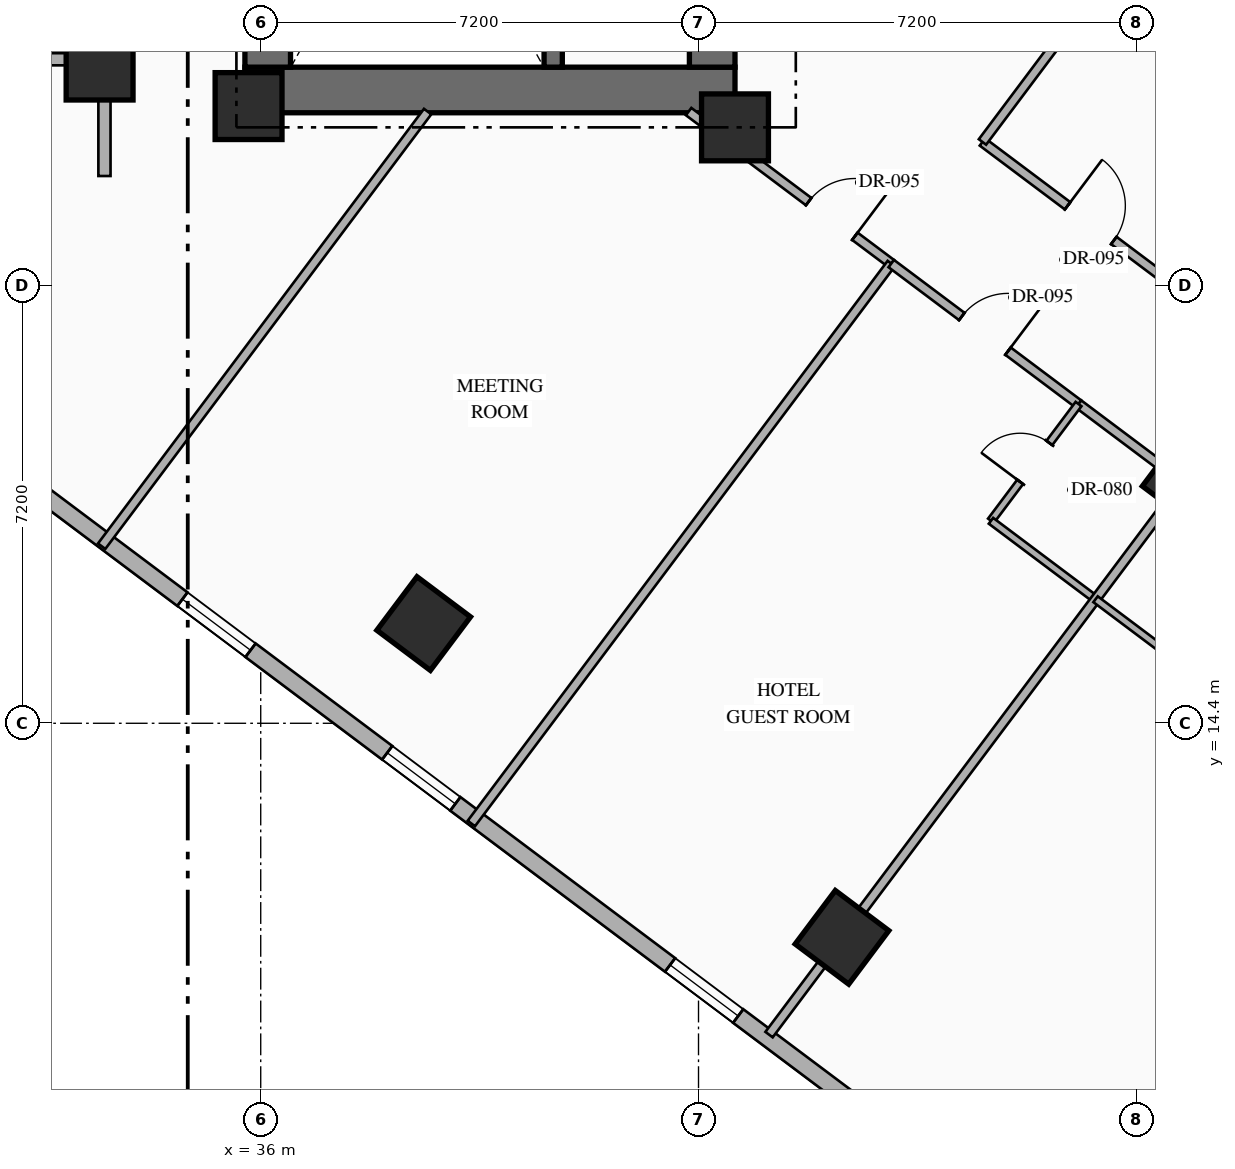
"""IFC4 building model, lengths in metres.
Left out: names, types, materials, properties, quantities, classifications, styles, units other than length and angle.
Written with IfcOpenShell. Run it as: python <this file> out.ifc"""

import sys

from ifc_helpers import new_model, si_unit, direction, frame, frame_2d, origin, origin_2d, place, context, subcontext, project, spatial, rectangle, hollow_rectangle, extrude, element, fill, save


model = new_model("IFC4")
c1 = context("Model", 3, precision=1e-05, world=origin(), true_north=direction((0.0, 1.0)))
c2 = subcontext(c1, "Body", "Model", "MODEL_VIEW")
j1 = project(units=[si_unit("LENGTHUNIT", "METRE"), si_unit("PLANEANGLEUNIT", "RADIAN")], contexts=[c1])
p1 = place(None, origin())
s1 = spatial("IfcSite", under=j1, at=p1, CompositionType="ELEMENT")
p2 = place(p1, origin())
s2 = spatial("IfcBuilding", under=s1, at=p2, CompositionType="ELEMENT")
p3 = place(p2, frame((0.0, 0.0, 53.35)))
s3 = spatial("IfcBuildingStorey", under=s2, at=p3, CompositionType="ELEMENT", Elevation=53.35)
p4 = place(p3, frame((35.74, 24.815, 0.0), z_axis=(0.0, 0.0, 1.0), x_axis=(1.0, 0.0, 0.0)))
e1 = element("IfcWall", 1, at=p4, inside=s3, PredefinedType="SHEAR", context=c2, shape_type="SweptSolid", body=[
    extrude(rectangle(XDim=8.06, YDim=0.75, at=frame_2d((4.03, 0.0))), origin(), (0.0, 0.0, 1.0), 3.35),
])
p5 = place(p3, frame((36.115, 25.19, 0.0), z_axis=(0.0, 0.0, 1.0), x_axis=(0.0, 1.0, 0.0)))
e2 = element("IfcWall", 2, at=p5, inside=s3, PredefinedType="SHEAR", context=c2, shape_type="SweptSolid", body=[
    extrude(rectangle(XDim=9.48, YDim=0.75, at=frame_2d((4.74, 0.0))), origin(), (0.0, 0.0, 1.0), 3.35),
])
p6 = place(p3, frame((43.425, 25.19, 0.0), z_axis=(0.0, 0.0, 1.0), x_axis=(0.0, 1.0, 0.0)))
e3 = element("IfcWall", 3, at=p6, inside=s3, PredefinedType="SHEAR", context=c2, shape_type="SweptSolid", body=[
    extrude(rectangle(XDim=9.48, YDim=0.75, at=frame_2d((4.74, 0.0))), origin(), (0.0, 0.0, 1.0), 3.35),
])
p7 = place(p6, frame((1.51, 0.0, 0.0)))
e4 = element("IfcOpeningElement", 4, at=p7, cuts=e3, PredefinedType="OPENING", context=c2, shape_type="SweptSolid", body=[
    extrude(rectangle(XDim=0.85, YDim=2.08, at=frame_2d((0.425, 1.04))), frame((0.0, 0.385, 0.0), z_axis=(0.0, -1.0, 0.0), x_axis=(1.0, 0.0, 0.0)), (0.0, 0.0, 1.0), 0.77),
])
p8 = place(p6, frame((4.76, 0.0, 0.0)))
e5 = element("IfcOpeningElement", 5, at=p8, cuts=e3, PredefinedType="OPENING", context=c2, shape_type="SweptSolid", body=[
    extrude(rectangle(XDim=0.85, YDim=2.08, at=frame_2d((0.425, 1.04))), frame((0.0, 0.385, 0.0), z_axis=(0.0, -1.0, 0.0), x_axis=(1.0, 0.0, 0.0)), (0.0, 0.0, 1.0), 0.77),
])
p9 = place(p3, frame((40.81, 25.19, 0.0), z_axis=(0.0, 0.0, 1.0), x_axis=(0.0, 1.0, 0.0)))
e6 = element("IfcWall", 6, at=p9, inside=s3, PredefinedType="SHEAR", context=c2, shape_type="SweptSolid", body=[
    extrude(rectangle(XDim=9.48, YDim=0.3, at=frame_2d((4.74, 0.0))), origin(), (0.0, 0.0, 1.0), 3.35),
])
for number, where, z_axis, x_axis in (
    (7, (35.8, 24.55, 0.0), (0.0, 0.0, 1.0), (1.0, 0.0, 0.0)),
    (8, (43.8, 24.2, 0.0), (0.0, 0.0, 1.0), (1.0, 0.0, 0.0)),
):
    element("IfcColumn", number, at=place(p3, frame(where, z_axis=z_axis, x_axis=x_axis)), inside=s3, PredefinedType="COLUMN", context=c2, shape_type="SweptSolid", body=[
        extrude(rectangle(XDim=1.1, YDim=1.1, at=origin_2d()), origin(), (0.0, 0.0, 1.0), 3.35),
    ])
for number, where, z_axis, x_axis in (
    (9, (33.35, 25.2, 0.0), (0.0, 0.0, 1.0), (1.0, 0.0, 0.0)),
    (10, (38.68, 16.04, 0.0), (0.0, 0.0, 1.0), (0.8, -0.6, 0.0)),
    (11, (45.56, 10.88, 0.0), (0.0, 0.0, 1.0), (0.8, -0.6, 0.0)),
):
    element("IfcColumn", number, at=place(p3, frame(where, z_axis=z_axis, x_axis=x_axis)), inside=s3, PredefinedType="COLUMN", context=c2, shape_type="SweptSolid", body=[
        extrude(hollow_rectangle(XDim=1.1, YDim=1.1, WallThickness=0.04, at=origin_2d()), origin(), (0.0, 0.0, 1.0), 3.35),
    ])
p10 = place(p3, frame((51.2, 18.4, 0.0), z_axis=(0.0, 0.0, 1.0), x_axis=(0.799999996291, -0.600000004945, 0.0)))
e12 = element("IfcColumn", 12, at=p10, inside=s3, PredefinedType="COLUMN", context=c2, shape_type="SweptSolid", body=[
    extrude(hollow_rectangle(XDim=1.0, YDim=1.0, WallThickness=0.038, at=origin_2d()), origin(), (0.0, 0.0, 1.0), 3.35),
])
p11 = place(p3, frame((44.86, 40.73, 0.0), z_axis=(0.0, 0.0, 1.0), x_axis=(0.800006902154, -0.599990797017, 0.0)))
e13 = element("IfcWall", 13, at=p11, inside=s3, PredefinedType="STANDARD", context=c2, shape_type="SweptSolid", body=[
    extrude(rectangle(XDim=29.712, YDim=0.28, at=frame_2d((14.856, 0.0))), origin(), (0.0, 0.0, 1.0), 3.13),
])
p12 = place(p11, frame((14.249, 0.0, 0.0)))
e14 = element("IfcOpeningElement", 14, at=p12, cuts=e13, PredefinedType="OPENING", context=c2, shape_type="SweptSolid", body=[
    extrude(rectangle(XDim=1.1, YDim=2.2, at=frame_2d((0.55, 1.1))), frame((0.0, 0.15, 0.0), z_axis=(0.0, -1.0, 0.0), x_axis=(1.0, 0.0, 0.0)), (0.0, 0.0, 1.0), 0.3),
])
p13 = place(p11, frame((1.612, 0.0, 0.85)))
e15 = element("IfcOpeningElement", 15, at=p13, cuts=e13, PredefinedType="OPENING", context=c2, shape_type="SweptSolid", body=[
    extrude(rectangle(XDim=1.4, YDim=1.8, at=frame_2d((0.7, 0.9))), frame((0.0, 0.15, 0.0), z_axis=(0.0, -1.0, 0.0), x_axis=(1.0, 0.0, 0.0)), (0.0, 0.0, 1.0), 0.3),
])
p14 = place(p11, frame((5.667, 0.0, 0.85)))
e16 = element("IfcOpeningElement", 16, at=p14, cuts=e13, PredefinedType="OPENING", context=c2, shape_type="SweptSolid", body=[
    extrude(rectangle(XDim=1.4, YDim=1.8, at=frame_2d((0.7, 0.9))), frame((0.0, 0.15, 0.0), z_axis=(0.0, -1.0, 0.0), x_axis=(1.0, 0.0, 0.0)), (0.0, 0.0, 1.0), 0.3),
])
p15 = place(p11, frame((9.912, 0.0, 0.85)))
e17 = element("IfcOpeningElement", 17, at=p15, cuts=e13, PredefinedType="OPENING", context=c2, shape_type="SweptSolid", body=[
    extrude(rectangle(XDim=1.4, YDim=1.8, at=frame_2d((0.7, 0.9))), frame((0.0, 0.15, 0.0), z_axis=(0.0, -1.0, 0.0), x_axis=(1.0, 0.0, 0.0)), (0.0, 0.0, 1.0), 0.3),
])
p16 = place(p11, frame((19.743, 0.0, 0.85)))
e18 = element("IfcOpeningElement", 18, at=p16, cuts=e13, PredefinedType="OPENING", context=c2, shape_type="SweptSolid", body=[
    extrude(rectangle(XDim=1.4, YDim=1.8, at=frame_2d((0.7, 0.9))), frame((0.0, 0.15, 0.0), z_axis=(0.0, -1.0, 0.0), x_axis=(1.0, 0.0, 0.0)), (0.0, 0.0, 1.0), 0.3),
])
p17 = place(p11, frame((22.645, 0.0, 0.85)))
e19 = element("IfcOpeningElement", 19, at=p17, cuts=e13, PredefinedType="OPENING", context=c2, shape_type="SweptSolid", body=[
    extrude(rectangle(XDim=1.4, YDim=1.8, at=frame_2d((0.7, 0.9))), frame((0.0, 0.15, 0.0), z_axis=(0.0, -1.0, 0.0), x_axis=(1.0, 0.0, 0.0)), (0.0, 0.0, 1.0), 0.3),
])
p18 = place(p11, frame((26.7, 0.0, 0.85)))
e20 = element("IfcOpeningElement", 20, at=p18, cuts=e13, PredefinedType="OPENING", context=c2, shape_type="SweptSolid", body=[
    extrude(rectangle(XDim=1.4, YDim=1.8, at=frame_2d((0.7, 0.9))), frame((0.0, 0.15, 0.0), z_axis=(0.0, -1.0, 0.0), x_axis=(1.0, 0.0, 0.0)), (0.0, 0.0, 1.0), 0.3),
])
p19 = place(p3, frame((53.318, 2.487, 0.0), z_axis=(0.0, 0.0, 1.0), x_axis=(-0.800004174678, 0.599994433723, 0.0)))
e21 = element("IfcWall", 21, at=p19, inside=s3, PredefinedType="STANDARD", context=c2, shape_type="SweptSolid", body=[
    extrude(rectangle(XDim=35.089, YDim=0.28, at=frame_2d((17.544, 0.0))), origin(), (0.0, 0.0, 1.0), 3.13),
])
p20 = place(p19, frame((1.931, 0.0, 0.85)))
e22 = element("IfcOpeningElement", 22, at=p20, cuts=e21, PredefinedType="OPENING", context=c2, shape_type="SweptSolid", body=[
    extrude(rectangle(XDim=1.4, YDim=1.8, at=frame_2d((0.7, 0.9))), frame((0.0, 0.15, 0.0), z_axis=(0.0, -1.0, 0.0), x_axis=(1.0, 0.0, 0.0)), (0.0, 0.0, 1.0), 0.3),
])
p21 = place(p19, frame((6.819, 0.0, 0.85)))
e23 = element("IfcOpeningElement", 23, at=p21, cuts=e21, PredefinedType="OPENING", context=c2, shape_type="SweptSolid", body=[
    extrude(rectangle(XDim=1.4, YDim=1.8, at=frame_2d((0.7, 0.9))), frame((0.0, 0.15, 0.0), z_axis=(0.0, -1.0, 0.0), x_axis=(1.0, 0.0, 0.0)), (0.0, 0.0, 1.0), 0.3),
])
p22 = place(p19, frame((11.832, 0.0, 0.85)))
e24 = element("IfcOpeningElement", 24, at=p22, cuts=e21, PredefinedType="OPENING", context=c2, shape_type="SweptSolid", body=[
    extrude(rectangle(XDim=1.4, YDim=1.8, at=frame_2d((0.7, 0.9))), frame((0.0, 0.15, 0.0), z_axis=(0.0, -1.0, 0.0), x_axis=(1.0, 0.0, 0.0)), (0.0, 0.0, 1.0), 0.3),
])
p23 = place(p19, frame((17.647, 0.0, 0.85)))
e25 = element("IfcOpeningElement", 25, at=p23, cuts=e21, PredefinedType="OPENING", context=c2, shape_type="SweptSolid", body=[
    extrude(rectangle(XDim=1.4, YDim=1.8, at=frame_2d((0.7, 0.9))), frame((0.0, 0.15, 0.0), z_axis=(0.0, -1.0, 0.0), x_axis=(1.0, 0.0, 0.0)), (0.0, 0.0, 1.0), 0.3),
])
p24 = place(p19, frame((21.857, 0.0, 0.85)))
e26 = element("IfcOpeningElement", 26, at=p24, cuts=e21, PredefinedType="OPENING", context=c2, shape_type="SweptSolid", body=[
    extrude(rectangle(XDim=1.4, YDim=1.8, at=frame_2d((0.7, 0.9))), frame((0.0, 0.15, 0.0), z_axis=(0.0, -1.0, 0.0), x_axis=(1.0, 0.0, 0.0)), (0.0, 0.0, 1.0), 0.3),
])
p25 = place(p19, frame((26.87, 0.0, 0.85)))
e27 = element("IfcOpeningElement", 27, at=p25, cuts=e21, PredefinedType="OPENING", context=c2, shape_type="SweptSolid", body=[
    extrude(rectangle(XDim=1.4, YDim=1.8, at=frame_2d((0.7, 0.9))), frame((0.0, 0.15, 0.0), z_axis=(0.0, -1.0, 0.0), x_axis=(1.0, 0.0, 0.0)), (0.0, 0.0, 1.0), 0.3),
])
p26 = place(p19, frame((31.757, 0.0, 0.85)))
e28 = element("IfcOpeningElement", 28, at=p26, cuts=e21, PredefinedType="OPENING", context=c2, shape_type="SweptSolid", body=[
    extrude(rectangle(XDim=1.4, YDim=1.8, at=frame_2d((0.7, 0.9))), frame((0.0, 0.15, 0.0), z_axis=(0.0, -1.0, 0.0), x_axis=(1.0, 0.0, 0.0)), (0.0, 0.0, 1.0), 0.3),
])
p27 = place(p3, frame((33.43, 23.4, 0.0), z_axis=(0.0, 0.0, 1.0), x_axis=(0.0, 1.0, 0.0)))
e29 = element("IfcWall", 29, at=p27, inside=s3, PredefinedType="STANDARD", context=c2, shape_type="SweptSolid", body=[
    extrude(rectangle(XDim=4.08, YDim=0.2, at=frame_2d((2.04, 0.0))), origin(), (0.0, 0.0, 1.0), 2.425),
])
p28 = place(p3, frame((25.55, 25.32, 0.0), z_axis=(0.0, 0.0, 1.0), x_axis=(1.0, 0.0, 0.0)))
e30 = element("IfcWall", 30, at=p28, inside=s3, PredefinedType="STANDARD", context=c2, shape_type="SweptSolid", body=[
    extrude(rectangle(XDim=7.88, YDim=0.2, at=frame_2d((3.94, 0.0))), origin(), (0.0, 0.0, 1.0), 2.525),
])
p29 = place(p3, frame((43.037, 24.46, 0.0), z_axis=(0.0, 0.0, 1.0), x_axis=(0.799971872363, -0.600037501685, 0.0)))
e31 = element("IfcWall", 31, at=p29, inside=s3, PredefinedType="PARTITIONING", context=c2, shape_type="SweptSolid", body=[
    extrude(rectangle(XDim=4.167, YDim=0.15, at=frame_2d((2.083, 0.0))), origin(), (0.0, 0.0, 1.0), 2.425),
])
p30 = place(p29, frame((2.468, 0.0, 0.0)))
e32 = element("IfcOpeningElement", 32, at=p30, cuts=e31, PredefinedType="OPENING", context=c2, shape_type="SweptSolid", body=[
    extrude(rectangle(XDim=0.95, YDim=2.15, at=frame_2d((0.475, 1.075))), frame((0.0, 0.085, 0.0), z_axis=(0.0, -1.0, 0.0), x_axis=(1.0, 0.0, 0.0)), (0.0, 0.0, 1.0), 0.17),
])
p31 = place(p3, frame((33.384, 17.312, 0.0), z_axis=(0.0, 0.0, 1.0), x_axis=(0.600008743659, 0.799993442181, 0.0)))
e33 = element("IfcWall", 33, at=p31, inside=s3, PredefinedType="PARTITIONING", context=c2, shape_type="SweptSolid", body=[
    extrude(rectangle(XDim=8.935, YDim=0.15, at=frame_2d((4.468, 0.0))), origin(), (0.0, 0.0, 1.0), 3.13),
])
p32 = place(p3, frame((39.464, 12.752, 0.0), z_axis=(0.0, 0.0, 1.0), x_axis=(0.6, 0.8, 0.0)))
e34 = element("IfcWall", 34, at=p32, inside=s3, PredefinedType="PARTITIONING", context=c2, shape_type="SweptSolid", body=[
    extrude(rectangle(XDim=11.51, YDim=0.15, at=frame_2d((5.755, 0.0))), origin(), (0.0, 0.0, 1.0), 3.13),
])
p33 = place(p3, frame((47.87, 23.96, 0.0), z_axis=(0.0, 0.0, 1.0), x_axis=(0.799993416095, -0.600008778439, 0.0)))
e35 = element("IfcWall", 35, at=p33, inside=s3, PredefinedType="PARTITIONING", context=c2, shape_type="SweptSolid", body=[
    extrude(rectangle(XDim=4.45, YDim=0.15, at=frame_2d((2.225, 0.0))), origin(), (0.0, 0.0, 1.0), 2.775),
])
p34 = place(p33, frame((1.75, 0.0, 0.0)))
e36 = element("IfcOpeningElement", 36, at=p34, cuts=e35, PredefinedType="OPENING", context=c2, shape_type="SweptSolid", body=[
    extrude(rectangle(XDim=0.95, YDim=2.15, at=frame_2d((0.475, 1.075))), frame((0.0, 0.085, 0.0), z_axis=(0.0, -1.0, 0.0), x_axis=(1.0, 0.0, 0.0)), (0.0, 0.0, 1.0), 0.17),
])
p35 = place(p3, frame((47.87, 23.96, 0.0), z_axis=(0.0, 0.0, 1.0), x_axis=(0.599996617946, 0.80000253653, 0.0)))
e37 = element("IfcWall", 37, at=p35, inside=s3, PredefinedType="PARTITIONING", context=c2, shape_type="SweptSolid", body=[
    extrude(rectangle(XDim=11.55, YDim=0.15, at=frame_2d((5.775, 0.0))), origin(), (0.0, 0.0, 1.0), 3.13),
])
p36 = place(p3, frame((46.37, 21.96, 0.0), z_axis=(0.0, 0.0, 1.0), x_axis=(0.799977170108, -0.600030438649, 0.0)))
e38 = element("IfcWall", 38, at=p36, inside=s3, PredefinedType="PARTITIONING", context=c2, shape_type="SweptSolid", body=[
    extrude(rectangle(XDim=3.85, YDim=0.15, at=frame_2d((1.925, 0.0))), origin(), (0.0, 0.0, 1.0), 2.425),
])
p37 = place(p36, frame((1.45, 0.0, 0.0)))
e39 = element("IfcOpeningElement", 39, at=p37, cuts=e38, PredefinedType="OPENING", context=c2, shape_type="SweptSolid", body=[
    extrude(rectangle(XDim=0.95, YDim=2.15, at=frame_2d((0.475, 1.075))), frame((0.0, 0.085, 0.0), z_axis=(0.0, -1.0, 0.0), x_axis=(1.0, 0.0, 0.0)), (0.0, 0.0, 1.0), 0.17),
])
p38 = place(p3, frame((49.45, 19.65, 0.0), z_axis=(0.0, 0.0, 1.0), x_axis=(0.800040880289, -0.59994548908, 0.0)))
e40 = element("IfcWall", 40, at=p38, inside=s3, PredefinedType="PARTITIONING", context=c2, shape_type="SweptSolid", body=[
    extrude(rectangle(XDim=2.15, YDim=0.15, at=frame_2d((1.075, 0.0))), origin(), (0.0, 0.0, 1.0), 2.425),
])
p39 = place(p3, frame((48.01, 17.73, 0.0), z_axis=(0.0, 0.0, 1.0), x_axis=(0.6, 0.8, 0.0)))
e41 = element("IfcWall", 41, at=p39, inside=s3, PredefinedType="PARTITIONING", context=c2, shape_type="SweptSolid", body=[
    extrude(rectangle(XDim=2.4, YDim=0.12, at=frame_2d((1.2, 0.0))), origin(), (0.0, 0.0, 1.0), 3.13),
])
p40 = place(p39, frame((0.8, 0.0, 0.0)))
e42 = element("IfcOpeningElement", 42, at=p40, cuts=e41, PredefinedType="OPENING", context=c2, shape_type="SweptSolid", body=[
    extrude(rectangle(XDim=0.8, YDim=2.06, at=frame_2d((0.4, 1.03))), frame((0.0, 0.07, 0.0), z_axis=(0.0, -1.0, 0.0), x_axis=(1.0, 0.0, 0.0)), (0.0, 0.0, 1.0), 0.14),
])
p41 = place(p3, frame((48.01, 17.73, 0.0), z_axis=(0.0, 0.0, 1.0), x_axis=(0.79998637334, -0.60001816845, 0.0)))
e43 = element("IfcWall", 43, at=p41, inside=s3, PredefinedType="PARTITIONING", context=c2, shape_type="SweptSolid", body=[
    extrude(rectangle(XDim=2.15, YDim=0.12, at=frame_2d((1.075, 0.0))), origin(), (0.0, 0.0, 1.0), 3.13),
])
p42 = place(p3, frame((44.36, 9.28, 0.0), z_axis=(0.0, 0.0, 1.0), x_axis=(0.599986233332, 0.800010324816, 0.0)))
e44 = element("IfcWall", 44, at=p42, inside=s3, PredefinedType="PARTITIONING", context=c2, shape_type="SweptSolid", body=[
    extrude(rectangle(XDim=11.35, YDim=0.15, at=frame_2d((5.675, 0.0))), origin(), (0.0, 0.0, 1.0), 2.425),
])
p43 = place(p3, frame((49.73, 16.44, 0.0), z_axis=(0.0, 0.0, 1.0), x_axis=(0.79998637334, -0.60001816845, 0.0)))
e45 = element("IfcWall", 45, at=p43, inside=s3, PredefinedType="PARTITIONING", context=c2, shape_type="SweptSolid", body=[
    extrude(rectangle(XDim=2.15, YDim=0.12, at=frame_2d((1.075, 0.0))), origin(), (0.0, 0.0, 1.0), 3.13),
])
p44 = place(p22, origin())
e46 = element("IfcWindow", 46, at=p44, inside=s3, PartitioningType="SINGLE_PANEL", PredefinedType="WINDOW", context=c2, shape_type="SweptSolid", body=[
    extrude(rectangle(XDim=1.4, YDim=1.8, at=frame_2d((0.7, 0.9))), frame((0.0, 0.03, 0.0), z_axis=(0.0, -1.0, 0.0), x_axis=(1.0, 0.0, 0.0)), (0.0, 0.0, 1.0), 0.06),
])
fill(e24, e46)
p45 = place(p23, origin())
e47 = element("IfcWindow", 47, at=p45, inside=s3, PartitioningType="SINGLE_PANEL", PredefinedType="WINDOW", context=c2, shape_type="SweptSolid", body=[
    extrude(rectangle(XDim=1.4, YDim=1.8, at=frame_2d((0.7, 0.9))), frame((0.0, 0.03, 0.0), z_axis=(0.0, -1.0, 0.0), x_axis=(1.0, 0.0, 0.0)), (0.0, 0.0, 1.0), 0.06),
])
fill(e25, e47)
p46 = place(p24, origin())
e48 = element("IfcWindow", 48, at=p46, inside=s3, PartitioningType="SINGLE_PANEL", PredefinedType="WINDOW", context=c2, shape_type="SweptSolid", body=[
    extrude(rectangle(XDim=1.4, YDim=1.8, at=frame_2d((0.7, 0.9))), frame((0.0, 0.03, 0.0), z_axis=(0.0, -1.0, 0.0), x_axis=(1.0, 0.0, 0.0)), (0.0, 0.0, 1.0), 0.06),
])
fill(e26, e48)
p47 = place(p30, origin())
e49 = element("IfcDoor", 49, at=p47, inside=s3, OperationType="SINGLE_SWING_RIGHT", PredefinedType="DOOR", context=c2, shape_type="SweptSolid", body=[
    extrude(rectangle(XDim=0.95, YDim=2.15, at=frame_2d((0.475, 1.075))), frame((0.0, 0.025, 0.0), z_axis=(0.0, -1.0, 0.0), x_axis=(1.0, 0.0, 0.0)), (0.0, 0.0, 1.0), 0.05),
])
fill(e32, e49)
p48 = place(p34, origin())
e50 = element("IfcDoor", 50, at=p48, inside=s3, OperationType="SINGLE_SWING_LEFT", PredefinedType="DOOR", context=c2, shape_type="SweptSolid", body=[
    extrude(rectangle(XDim=0.95, YDim=2.15, at=frame_2d((0.475, 1.075))), frame((0.0, 0.025, 0.0), z_axis=(0.0, -1.0, 0.0), x_axis=(1.0, 0.0, 0.0)), (0.0, 0.0, 1.0), 0.05),
])
fill(e36, e50)
p49 = place(p37, origin())
e51 = element("IfcDoor", 51, at=p49, inside=s3, OperationType="SINGLE_SWING_RIGHT", PredefinedType="DOOR", context=c2, shape_type="SweptSolid", body=[
    extrude(rectangle(XDim=0.95, YDim=2.15, at=frame_2d((0.475, 1.075))), frame((0.0, 0.025, 0.0), z_axis=(0.0, -1.0, 0.0), x_axis=(1.0, 0.0, 0.0)), (0.0, 0.0, 1.0), 0.05),
])
fill(e39, e51)
p50 = place(p40, origin())
e52 = element("IfcDoor", 52, at=p50, inside=s3, OperationType="SINGLE_SWING_LEFT", PredefinedType="DOOR", context=c2, shape_type="SweptSolid", body=[
    extrude(rectangle(XDim=0.8, YDim=2.06, at=frame_2d((0.4, 1.03))), frame((0.0, 0.025, 0.0), z_axis=(0.0, -1.0, 0.0), x_axis=(1.0, 0.0, 0.0)), (0.0, 0.0, 1.0), 0.05),
])
fill(e42, e52)
save(model, sys.argv[1])
